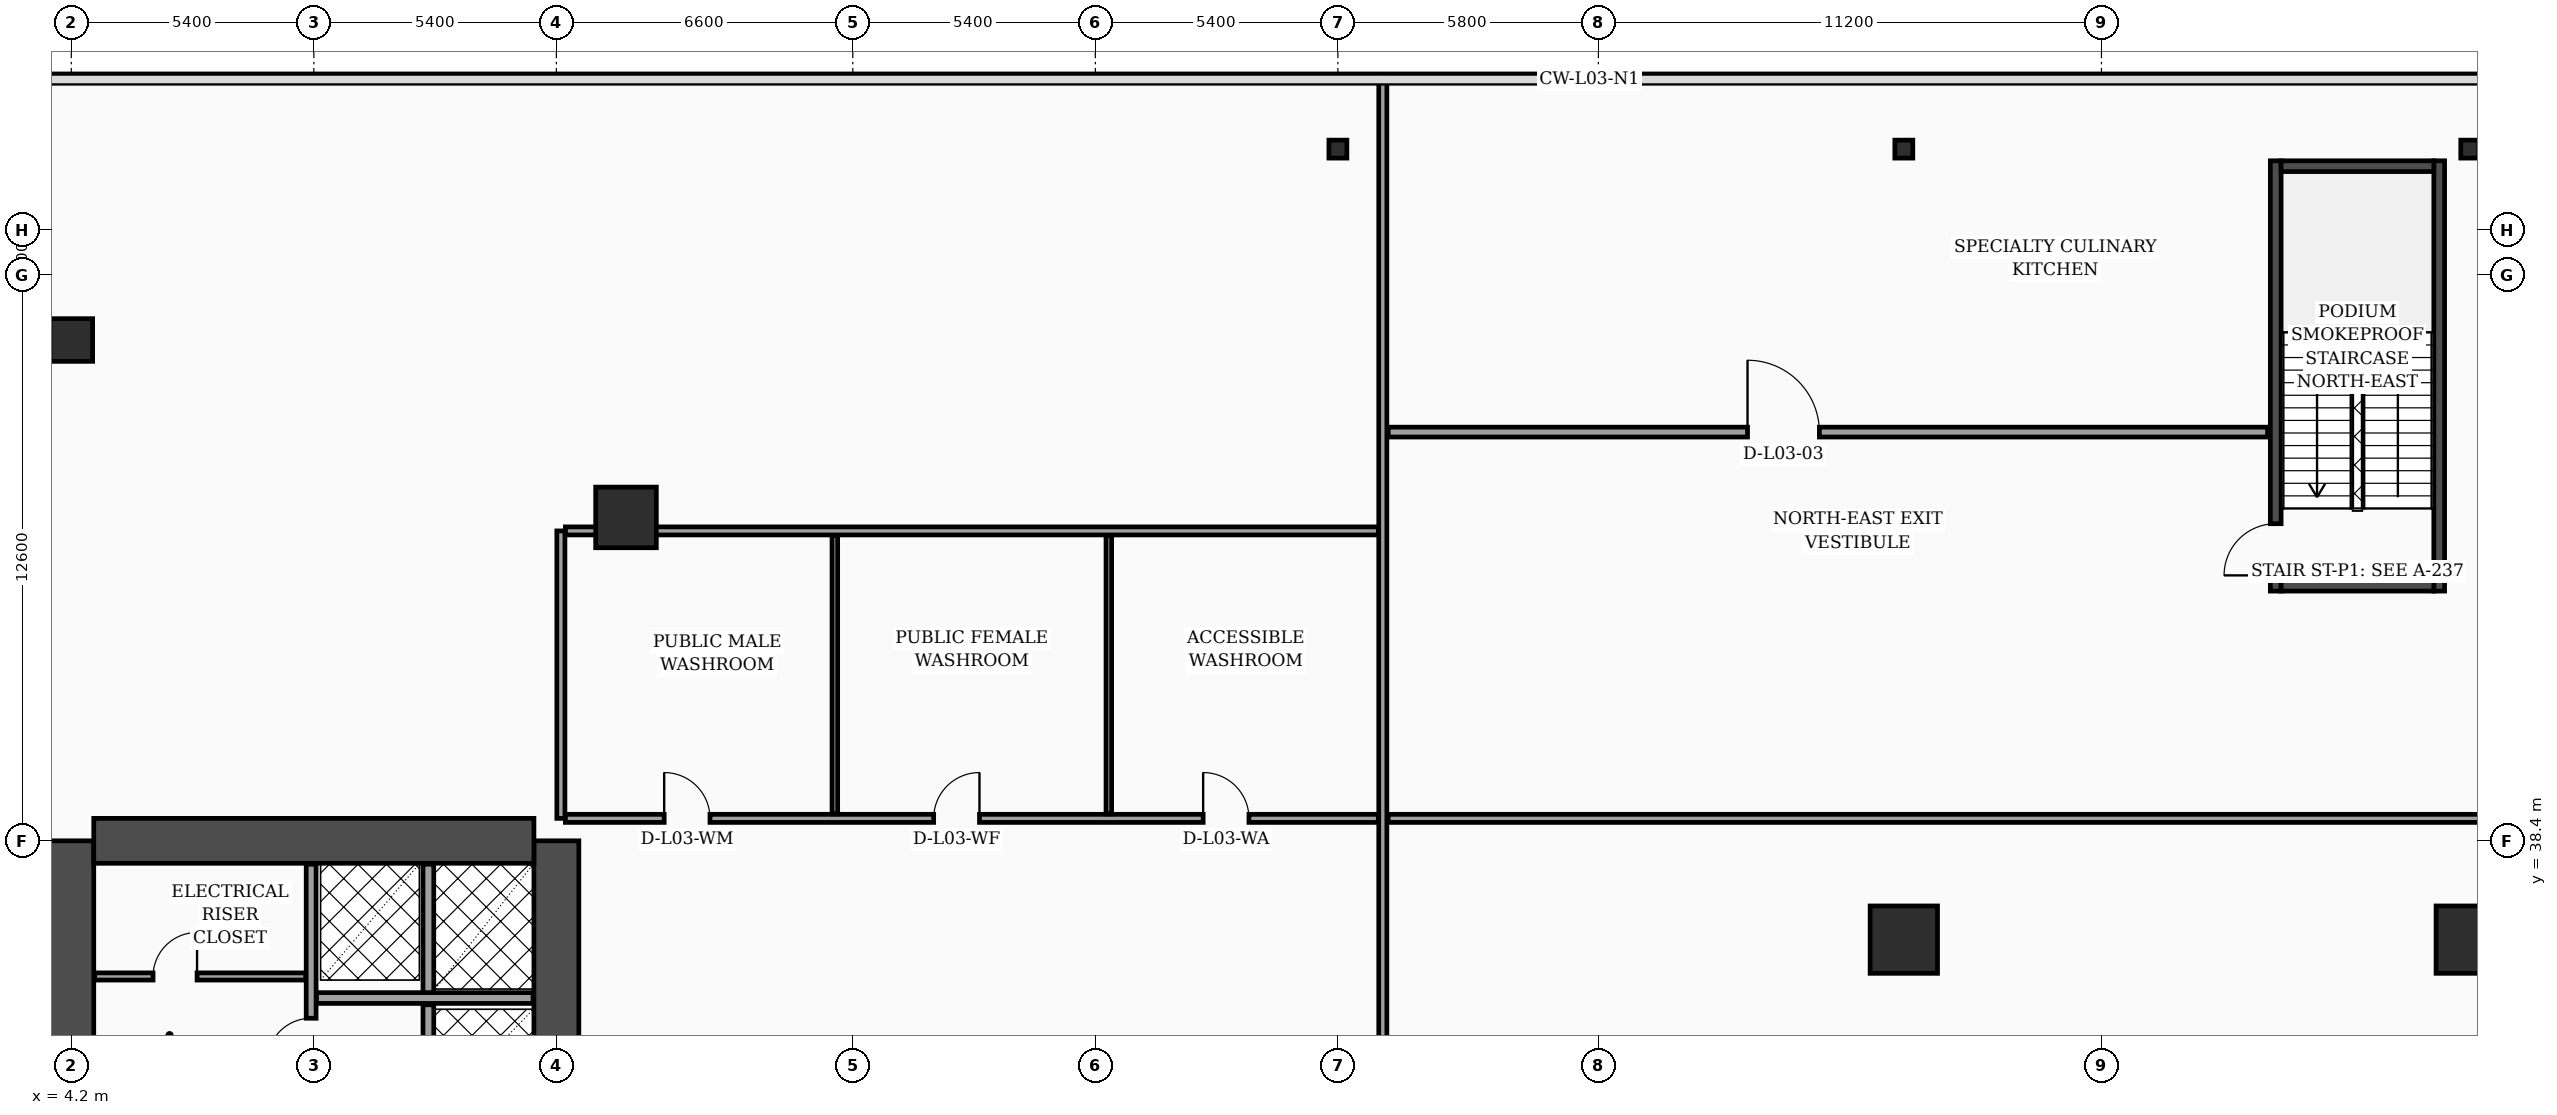
"""IFC4 building model, lengths in metres.
Left out: names, types, materials, properties, quantities, classifications, styles, units other than length and angle.
Written with IfcOpenShell. Run it as: python <this file> out.ifc"""

import sys

from ifc_helpers import new_model, si_unit, direction, frame, frame_2d, origin, origin_2d, place, context, subcontext, project, spatial, rectangle, hollow_rectangle, i_section, extrude, element, fill, save


model = new_model("IFC4")
c1 = context("Model", 3, precision=1e-05, world=origin(), true_north=direction((0.0, 1.0)))
c2 = subcontext(c1, "Body", "Model", "MODEL_VIEW")
j1 = project(units=[si_unit("LENGTHUNIT", "METRE"), si_unit("PLANEANGLEUNIT", "RADIAN")], contexts=[c1])
p1 = place(None, origin())
s1 = spatial("IfcSite", under=j1, at=p1, CompositionType="ELEMENT")
p2 = place(p1, origin())
s2 = spatial("IfcBuilding", under=s1, at=p2, CompositionType="ELEMENT")
p3 = place(p2, frame((0.0, 0.0, 17.0)))
s3 = spatial("IfcBuildingStorey", under=s2, at=p3, CompositionType="ELEMENT", Elevation=17.0)
p4 = place(p3, frame((4.2, 16.8, 0.0), z_axis=(0.0, 0.0, 1.0), x_axis=(0.0, 1.0, 0.0)))
e1 = element("IfcWall", 1, at=p4, inside=s3, PredefinedType="SHEAR", context=c2, shape_type="SweptSolid", body=[
    extrude(rectangle(XDim=21.6, YDim=1.0, at=frame_2d((10.8, 0.0))), origin(), (0.0, 0.0, 1.0), 4.55),
])
p5 = place(p3, frame((15.0, 16.8, 0.0), z_axis=(0.0, 0.0, 1.0), x_axis=(0.0, 1.0, 0.0)))
e2 = element("IfcWall", 2, at=p5, inside=s3, PredefinedType="SHEAR", context=c2, shape_type="SweptSolid", body=[
    extrude(rectangle(XDim=21.6, YDim=1.0, at=frame_2d((10.8, 0.0))), origin(), (0.0, 0.0, 1.0), 4.55),
])
p6 = place(p5, frame((8.65, 0.0, 0.0)))
e3 = element("IfcOpeningElement", 3, at=p6, cuts=e2, PredefinedType="OPENING", context=c2, shape_type="SweptSolid", body=[
    extrude(rectangle(XDim=1.1, YDim=2.2, at=frame_2d((0.55, 1.1))), frame((0.0, 0.51, 0.0), z_axis=(0.0, -1.0, 0.0), x_axis=(1.0, 0.0, 0.0)), (0.0, 0.0, 1.0), 1.02),
])
p7 = place(p5, frame((1.25, 0.0, 0.0)))
e4 = element("IfcOpeningElement", 4, at=p7, cuts=e2, PredefinedType="OPENING", context=c2, shape_type="SweptSolid", body=[
    extrude(rectangle(XDim=1.1, YDim=2.2, at=frame_2d((0.55, 1.1))), frame((0.0, 0.51, 0.0), z_axis=(0.0, -1.0, 0.0), x_axis=(1.0, 0.0, 0.0)), (0.0, 0.0, 1.0), 1.02),
])
p8 = place(p5, frame((3.8, 0.0, 0.0)))
e5 = element("IfcOpeningElement", 5, at=p8, cuts=e2, PredefinedType="OPENING", context=c2, shape_type="SweptSolid", body=[
    extrude(rectangle(XDim=1.1, YDim=2.2, at=frame_2d((0.55, 1.1))), frame((0.0, 0.51, 0.0), z_axis=(0.0, -1.0, 0.0), x_axis=(1.0, 0.0, 0.0)), (0.0, 0.0, 1.0), 1.02),
])
p9 = place(p5, frame((6.35, 0.0, 0.0)))
e6 = element("IfcOpeningElement", 6, at=p9, cuts=e2, PredefinedType="OPENING", context=c2, shape_type="SweptSolid", body=[
    extrude(rectangle(XDim=1.1, YDim=2.2, at=frame_2d((0.55, 1.1))), frame((0.0, 0.51, 0.0), z_axis=(0.0, -1.0, 0.0), x_axis=(1.0, 0.0, 0.0)), (0.0, 0.0, 1.0), 1.02),
])
p10 = place(p3, frame((4.7, 38.4, 0.0), z_axis=(0.0, 0.0, 1.0), x_axis=(1.0, 0.0, 0.0)))
e7 = element("IfcWall", 7, at=p10, inside=s3, PredefinedType="SHEAR", context=c2, shape_type="SweptSolid", body=[
    extrude(rectangle(XDim=9.8, YDim=1.0, at=frame_2d((4.9, 0.0))), origin(), (0.0, 0.0, 1.0), 4.55),
])
p11 = place(p3, frame((53.28, 43.96, 0.0), z_axis=(0.0, 0.0, 1.0), x_axis=(0.0, 1.0, 0.0)))
e8 = element("IfcWall", 8, at=p11, inside=s3, PredefinedType="SOLIDWALL", context=c2, shape_type="SweptSolid", body=[
    extrude(rectangle(XDim=9.58, YDim=0.24, at=frame_2d((4.79, 0.0))), origin(), (0.0, 0.0, 1.0), 4.55),
])
p12 = place(p11, frame((0.35, 0.0, 0.0)))
e9 = element("IfcOpeningElement", 9, at=p12, cuts=e8, PredefinedType="OPENING", context=c2, shape_type="SweptSolid", body=[
    extrude(rectangle(XDim=1.15, YDim=2.2, at=frame_2d((0.575, 1.1))), frame((0.0, 0.13, 0.0), z_axis=(0.0, -1.0, 0.0), x_axis=(1.0, 0.0, 0.0)), (0.0, 0.0, 1.0), 0.26),
])
p13 = place(p3, frame((56.92, 43.96, 0.0), z_axis=(0.0, 0.0, 1.0), x_axis=(0.0, 1.0, 0.0)))
e10 = element("IfcWall", 10, at=p13, inside=s3, PredefinedType="SOLIDWALL", context=c2, shape_type="SweptSolid", body=[
    extrude(rectangle(XDim=9.58, YDim=0.24, at=frame_2d((4.79, 0.0))), origin(), (0.0, 0.0, 1.0), 4.55),
])
for number, where, z_axis, x_axis in (
    (11, (53.4, 44.08, 0.0), (0.0, 0.0, 1.0), (1.0, 0.0, 0.0)),
    (12, (53.4, 53.42, 0.0), (0.0, 0.0, 1.0), (1.0, 0.0, 0.0)),
):
    element("IfcWall", number, at=place(p3, frame(where, z_axis=z_axis, x_axis=x_axis)), inside=s3, PredefinedType="SOLIDWALL", context=c2, shape_type="SweptSolid", body=[
        extrude(rectangle(XDim=3.4, YDim=0.24, at=frame_2d((1.7, 0.0))), origin(), (0.0, 0.0, 1.0), 4.55),
    ])
p14 = place(p3, frame((4.2, 49.55, 0.0), z_axis=(0.0, 0.0, 1.0), x_axis=(1.0, 0.0, 0.0)))
e13 = element("IfcColumn", 13, at=p14, inside=s3, PredefinedType="COLUMN", context=c2, shape_type="SweptSolid", body=[
    extrude(hollow_rectangle(XDim=0.95, YDim=0.95, WallThickness=0.04, at=origin_2d()), origin(), (0.0, 0.0, 1.0), 4.55),
])
p15 = place(p3, frame((16.55, 45.6, 0.0), z_axis=(0.0, 0.0, 1.0), x_axis=(1.0, 0.0, 0.0)))
e14 = element("IfcColumn", 14, at=p15, inside=s3, PredefinedType="COLUMN", context=c2, shape_type="SweptSolid", body=[
    extrude(rectangle(XDim=1.35, YDim=1.35, at=origin_2d()), origin(), (0.0, 0.0, 1.0), 4.55),
])
for number, where, z_axis, x_axis in (
    (15, (45.0, 36.2, 0.0), (0.0, 0.0, 1.0), (1.0, 0.0, 0.0)),
    (16, (57.6, 36.2, 0.0), (0.0, 0.0, 1.0), (1.0, 0.0, 0.0)),
):
    element("IfcColumn", number, at=place(p3, frame(where, z_axis=z_axis, x_axis=x_axis)), inside=s3, PredefinedType="COLUMN", context=c2, shape_type="SweptSolid", body=[
        extrude(rectangle(XDim=1.5, YDim=1.5, at=origin_2d()), origin(), (0.0, 0.0, 1.0), 4.55),
    ])
for number, where, z_axis, x_axis in (
    (17, (32.4, 53.8, 0.0), (0.0, 0.0, 1.0), (1.0, 0.0, 0.0)),
    (18, (45.0, 53.8, 0.0), (0.0, 0.0, 1.0), (1.0, 0.0, 0.0)),
    (19, (57.6, 53.8, 0.0), (0.0, 0.0, 1.0), (1.0, 0.0, 0.0)),
):
    element("IfcColumn", number, at=place(p3, frame(where, z_axis=z_axis, x_axis=x_axis)), inside=s3, PredefinedType="PILASTER", context=c2, shape_type="SweptSolid", body=[
        extrude(i_section(OverallWidth=0.4, OverallDepth=0.4, WebThickness=0.013, FlangeThickness=0.021, FilletRadius=0.022, at=origin_2d()), origin(), (0.0, 0.0, 1.0), 4.55),
    ])
p16 = place(p3, frame((4.72, 35.38, 0.0), z_axis=(0.0, 0.0, 1.0), x_axis=(1.0, 0.0, 0.0)))
e20 = element("IfcWall", 20, at=p16, inside=s3, PredefinedType="PARTITIONING", context=c2, shape_type="SweptSolid", body=[
    extrude(rectangle(XDim=4.7, YDim=0.16, at=frame_2d((2.35, 0.0))), origin(), (0.0, 0.0, 1.0), 4.55),
])
p17 = place(p16, frame((1.3, 0.0, 0.0)))
e21 = element("IfcOpeningElement", 21, at=p17, cuts=e20, PredefinedType="OPENING", context=c2, shape_type="SweptSolid", body=[
    extrude(rectangle(XDim=0.98, YDim=2.15, at=frame_2d((0.49, 1.075))), frame((0.0, 0.09, 0.0), z_axis=(0.0, -1.0, 0.0), x_axis=(1.0, 0.0, 0.0)), (0.0, 0.0, 1.0), 0.18),
])
p18 = place(p3, frame((9.54, 32.92, 0.0), z_axis=(0.0, 0.0, 1.0), x_axis=(0.0, 1.0, 0.0)))
e22 = element("IfcWall", 22, at=p18, inside=s3, PredefinedType="SOLIDWALL", context=c2, shape_type="SweptSolid", body=[
    extrude(rectangle(XDim=4.96, YDim=0.22, at=frame_2d((2.48, 0.0))), origin(), (0.0, 0.0, 1.0), 4.55),
])
p19 = place(p18, frame((0.55, 0.0, 0.0)))
e23 = element("IfcOpeningElement", 23, at=p19, cuts=e22, PredefinedType="OPENING", context=c2, shape_type="SweptSolid", body=[
    extrude(rectangle(XDim=0.98, YDim=2.15, at=frame_2d((0.49, 1.075))), frame((0.0, 0.12, 0.0), z_axis=(0.0, -1.0, 0.0), x_axis=(1.0, 0.0, 0.0)), (0.0, 0.0, 1.0), 0.24),
])
p20 = place(p3, frame((12.15, 27.0, 0.0), z_axis=(0.0, 0.0, 1.0), x_axis=(0.0, 1.0, 0.0)))
e24 = element("IfcWall", 24, at=p20, inside=s3, PredefinedType="SOLIDWALL", context=c2, shape_type="SweptSolid", body=[
    extrude(rectangle(XDim=7.75, YDim=0.24, at=frame_2d((3.875, 0.0))), origin(), (0.0, 0.0, 1.0), 4.55),
])
p21 = place(p3, frame((9.66, 34.9, 0.0), z_axis=(0.0, 0.0, 1.0), x_axis=(1.0, 0.0, 0.0)))
e25 = element("IfcWall", 25, at=p21, inside=s3, PredefinedType="SOLIDWALL", context=c2, shape_type="SweptSolid", body=[
    extrude(rectangle(XDim=4.82, YDim=0.24, at=frame_2d((2.41, 0.0))), origin(), (0.0, 0.0, 1.0), 4.55),
])
p22 = place(p3, frame((12.15, 35.02, 0.0), z_axis=(0.0, 0.0, 1.0), x_axis=(0.0, 1.0, 0.0)))
e26 = element("IfcWall", 26, at=p22, inside=s3, PredefinedType="SOLIDWALL", context=c2, shape_type="SweptSolid", body=[
    extrude(rectangle(XDim=2.86, YDim=0.24, at=frame_2d((1.43, 0.0))), origin(), (0.0, 0.0, 1.0), 4.55),
])
p23 = place(p3, frame((15.2, 38.9, 0.0), z_axis=(0.0, 0.0, 1.0), x_axis=(1.0, 0.0, 0.0)))
e27 = element("IfcWall", 27, at=p23, inside=s3, PredefinedType="PARTITIONING", context=c2, shape_type="SweptSolid", body=[
    extrude(rectangle(XDim=18.1, YDim=0.18, at=frame_2d((9.05, 0.0))), origin(), (0.0, 0.0, 1.0), 3.75),
])
p24 = place(p23, frame((2.2, 0.0, 0.0)))
e28 = element("IfcOpeningElement", 28, at=p24, cuts=e27, PredefinedType="OPENING", context=c2, shape_type="SweptSolid", body=[
    extrude(rectangle(XDim=1.02, YDim=2.2, at=frame_2d((0.51, 1.1))), frame((0.0, 0.1, 0.0), z_axis=(0.0, -1.0, 0.0), x_axis=(1.0, 0.0, 0.0)), (0.0, 0.0, 1.0), 0.2),
])
p25 = place(p23, frame((8.2, 0.0, 0.0)))
e29 = element("IfcOpeningElement", 29, at=p25, cuts=e27, PredefinedType="OPENING", context=c2, shape_type="SweptSolid", body=[
    extrude(rectangle(XDim=1.02, YDim=2.2, at=frame_2d((0.51, 1.1))), frame((0.0, 0.1, 0.0), z_axis=(0.0, -1.0, 0.0), x_axis=(1.0, 0.0, 0.0)), (0.0, 0.0, 1.0), 0.2),
])
p26 = place(p23, frame((14.2, 0.0, 0.0)))
e30 = element("IfcOpeningElement", 30, at=p26, cuts=e27, PredefinedType="OPENING", context=c2, shape_type="SweptSolid", body=[
    extrude(rectangle(XDim=1.02, YDim=2.2, at=frame_2d((0.51, 1.1))), frame((0.0, 0.1, 0.0), z_axis=(0.0, -1.0, 0.0), x_axis=(1.0, 0.0, 0.0)), (0.0, 0.0, 1.0), 0.2),
])
p27 = place(p3, frame((15.2, 45.3, 0.0), z_axis=(0.0, 0.0, 1.0), x_axis=(1.0, 0.0, 0.0)))
e31 = element("IfcWall", 31, at=p27, inside=s3, PredefinedType="PARTITIONING", context=c2, shape_type="SweptSolid", body=[
    extrude(rectangle(XDim=18.1, YDim=0.18, at=frame_2d((9.05, 0.0))), origin(), (0.0, 0.0, 1.0), 3.75),
])
p28 = place(p3, frame((15.1, 38.9, 0.0), z_axis=(0.0, 0.0, 1.0), x_axis=(0.0, 1.0, 0.0)))
e32 = element("IfcWall", 32, at=p28, inside=s3, PredefinedType="PARTITIONING", context=c2, shape_type="SweptSolid", body=[
    extrude(rectangle(XDim=6.4, YDim=0.18, at=frame_2d((3.2, 0.0))), origin(), (0.0, 0.0, 1.0), 3.75),
])
p29 = place(p3, frame((21.2, 39.0, 0.0), z_axis=(0.0, 0.0, 1.0), x_axis=(0.0, 1.0, 0.0)))
e33 = element("IfcWall", 33, at=p29, inside=s3, PredefinedType="PARTITIONING", context=c2, shape_type="SweptSolid", body=[
    extrude(rectangle(XDim=6.2, YDim=0.125, at=frame_2d((3.1, 0.0))), origin(), (0.0, 0.0, 1.0), 3.75),
])
p30 = place(p3, frame((27.3, 39.0, 0.0), z_axis=(0.0, 0.0, 1.0), x_axis=(0.0, 1.0, 0.0)))
e34 = element("IfcWall", 34, at=p30, inside=s3, PredefinedType="PARTITIONING", context=c2, shape_type="SweptSolid", body=[
    extrude(rectangle(XDim=6.2, YDim=0.125, at=frame_2d((3.1, 0.0))), origin(), (0.0, 0.0, 1.0), 4.55),
])
p31 = place(p3, frame((33.4, 0.06, 0.0), z_axis=(0.0, 0.0, 1.0), x_axis=(0.0, 1.0, 0.0)))
e35 = element("IfcWall", 35, at=p31, inside=s3, PredefinedType="PARTITIONING", context=c2, shape_type="SweptSolid", body=[
    extrude(rectangle(XDim=55.38, YDim=0.18, at=frame_2d((27.69, 0.0))), origin(), (0.0, 0.0, 1.0), 3.75),
])
p32 = place(p31, frame((18.5, 0.0, 0.0)))
e36 = element("IfcOpeningElement", 36, at=p32, cuts=e35, PredefinedType="OPENING", context=c2, shape_type="SweptSolid", body=[
    extrude(rectangle(XDim=1.8, YDim=2.4, at=frame_2d((0.9, 1.2))), frame((0.0, 0.1, 0.0), z_axis=(0.0, -1.0, 0.0), x_axis=(1.0, 0.0, 0.0)), (0.0, 0.0, 1.0), 0.2),
])
p33 = place(p31, frame((31.0, 0.0, 0.0)))
e37 = element("IfcOpeningElement", 37, at=p33, cuts=e35, PredefinedType="OPENING", context=c2, shape_type="SweptSolid", body=[
    extrude(rectangle(XDim=1.8, YDim=2.4, at=frame_2d((0.9, 1.2))), frame((0.0, 0.1, 0.0), z_axis=(0.0, -1.0, 0.0), x_axis=(1.0, 0.0, 0.0)), (0.0, 0.0, 1.0), 0.2),
])
p34 = place(p3, frame((33.52, 38.9, 0.0), z_axis=(0.0, 0.0, 1.0), x_axis=(1.0, 0.0, 0.0)))
e38 = element("IfcWall", 38, at=p34, inside=s3, PredefinedType="PARTITIONING", context=c2, shape_type="SweptSolid", body=[
    extrude(rectangle(XDim=42.16, YDim=0.18, at=frame_2d((21.08, 0.0))), origin(), (0.0, 0.0, 1.0), 3.75),
])
p35 = place(p3, frame((33.52, 47.5, 0.0), z_axis=(0.0, 0.0, 1.0), x_axis=(1.0, 0.0, 0.0)))
e39 = element("IfcWall", 39, at=p35, inside=s3, PredefinedType="SOLIDWALL", context=c2, shape_type="SweptSolid", body=[
    extrude(rectangle(XDim=19.58, YDim=0.22, at=frame_2d((9.79, 0.0))), origin(), (0.0, 0.0, 1.0), 3.75),
])
p36 = place(p35, frame((8.0, 0.0, 0.0)))
e40 = element("IfcOpeningElement", 40, at=p36, cuts=e39, PredefinedType="OPENING", context=c2, shape_type="SweptSolid", body=[
    extrude(rectangle(XDim=1.6, YDim=2.35, at=frame_2d((0.8, 1.175))), frame((0.0, 0.12, 0.0), z_axis=(0.0, -1.0, 0.0), x_axis=(1.0, 0.0, 0.0)), (0.0, 0.0, 1.0), 0.24),
])
p37 = place(p17, origin())
e41 = element("IfcDoor", 41, at=p37, inside=s3, OperationType="SINGLE_SWING_RIGHT", PredefinedType="DOOR", context=c2, shape_type="SweptSolid", body=[
    extrude(rectangle(XDim=0.98, YDim=2.15, at=frame_2d((0.49, 1.075))), frame((0.0, 0.025, 0.0), z_axis=(0.0, -1.0, 0.0), x_axis=(1.0, 0.0, 0.0)), (0.0, 0.0, 1.0), 0.05),
])
fill(e21, e41)
p38 = place(p19, origin())
e42 = element("IfcDoor", 42, at=p38, inside=s3, OperationType="SINGLE_SWING_LEFT", PredefinedType="DOOR", context=c2, shape_type="SweptSolid", body=[
    extrude(rectangle(XDim=0.98, YDim=2.15, at=frame_2d((0.49, 1.075))), frame((0.0, 0.025, 0.0), z_axis=(0.0, -1.0, 0.0), x_axis=(1.0, 0.0, 0.0)), (0.0, 0.0, 1.0), 0.05),
])
fill(e23, e42)
p39 = place(p24, origin())
e43 = element("IfcDoor", 43, at=p39, inside=s3, OperationType="SINGLE_SWING_LEFT", PredefinedType="DOOR", context=c2, shape_type="SweptSolid", body=[
    extrude(rectangle(XDim=1.02, YDim=2.2, at=frame_2d((0.51, 1.1))), frame((0.0, 0.025, 0.0), z_axis=(0.0, -1.0, 0.0), x_axis=(1.0, 0.0, 0.0)), (0.0, 0.0, 1.0), 0.05),
])
fill(e28, e43)
p40 = place(p25, origin())
e44 = element("IfcDoor", 44, at=p40, inside=s3, OperationType="SINGLE_SWING_RIGHT", PredefinedType="DOOR", context=c2, shape_type="SweptSolid", body=[
    extrude(rectangle(XDim=1.02, YDim=2.2, at=frame_2d((0.51, 1.1))), frame((0.0, 0.025, 0.0), z_axis=(0.0, -1.0, 0.0), x_axis=(1.0, 0.0, 0.0)), (0.0, 0.0, 1.0), 0.05),
])
fill(e29, e44)
p41 = place(p26, origin())
e45 = element("IfcDoor", 45, at=p41, inside=s3, OperationType="SINGLE_SWING_LEFT", PredefinedType="DOOR", context=c2, shape_type="SweptSolid", body=[
    extrude(rectangle(XDim=1.02, YDim=2.2, at=frame_2d((0.51, 1.1))), frame((0.0, 0.025, 0.0), z_axis=(0.0, -1.0, 0.0), x_axis=(1.0, 0.0, 0.0)), (0.0, 0.0, 1.0), 0.05),
])
fill(e30, e45)
p42 = place(p36, origin())
e46 = element("IfcDoor", 46, at=p42, inside=s3, OperationType="SINGLE_SWING_LEFT", PredefinedType="DOOR", context=c2, shape_type="SweptSolid", body=[
    extrude(rectangle(XDim=1.6, YDim=2.35, at=frame_2d((0.8, 1.175))), frame((0.0, 0.025, 0.0), z_axis=(0.0, -1.0, 0.0), x_axis=(1.0, 0.0, 0.0)), (0.0, 0.0, 1.0), 0.05),
])
fill(e40, e46)
p43 = place(p12, origin())
e47 = element("IfcDoor", 47, at=p43, inside=s3, OperationType="SINGLE_SWING_LEFT", PredefinedType="DOOR", context=c2, shape_type="SweptSolid", body=[
    extrude(rectangle(XDim=1.15, YDim=2.2, at=frame_2d((0.575, 1.1))), frame((0.0, 0.025, 0.0), z_axis=(0.0, -1.0, 0.0), x_axis=(1.0, 0.0, 0.0)), (0.0, 0.0, 1.0), 0.05),
])
fill(e9, e47)
save(model, sys.argv[1])
